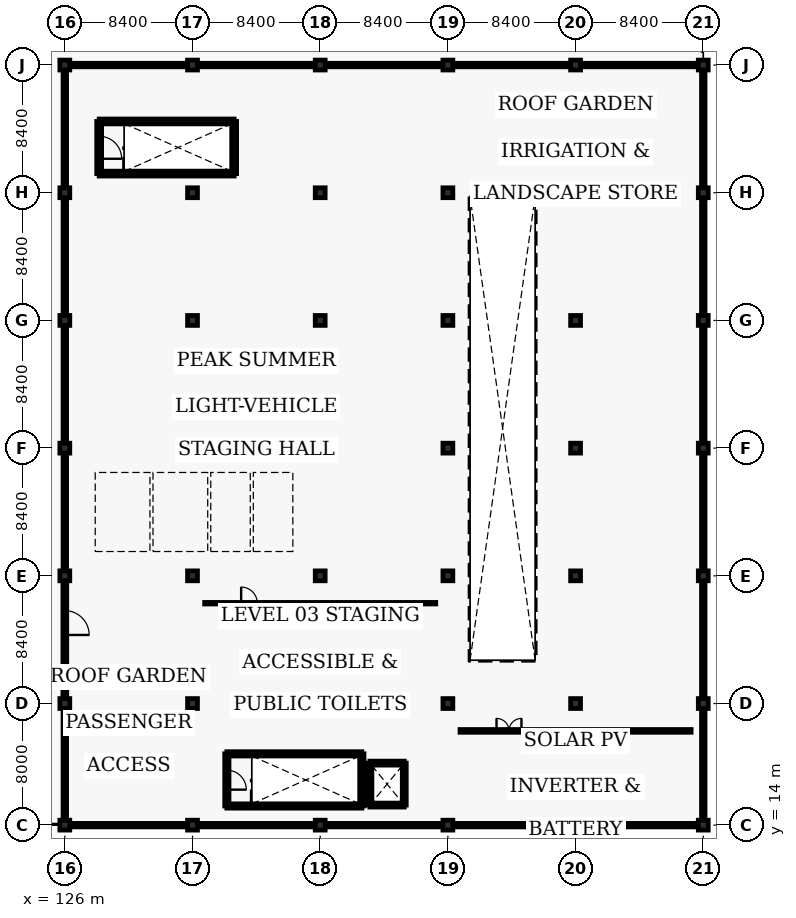
"""IFC4 building model, lengths in metres.
Left out: names, types, materials, properties, quantities, classifications, styles, units other than length and angle.
Written with IfcOpenShell. Run it as: python <this file> out.ifc"""

import sys

from ifc_helpers import new_model, si_unit, direction, frame, frame_2d, origin, origin_2d, place, context, subcontext, project, spatial, rectangle, extrude, element, fill, save


model = new_model("IFC4")
c1 = context("Model", 3, precision=1e-05, world=origin(), true_north=direction((0.0, 1.0)))
c2 = subcontext(c1, "Body", "Model", "MODEL_VIEW")
j1 = project(units=[si_unit("LENGTHUNIT", "METRE"), si_unit("PLANEANGLEUNIT", "RADIAN")], contexts=[c1])
p1 = place(None, origin())
s1 = spatial("IfcSite", under=j1, at=p1, CompositionType="ELEMENT")
p2 = place(p1, origin())
s2 = spatial("IfcBuilding", under=s1, at=p2, CompositionType="ELEMENT")
p3 = place(p2, frame((0.0, 0.0, 13.12)))
s3 = spatial("IfcBuildingStorey", under=s2, at=p3, CompositionType="ELEMENT", Elevation=13.12)
for number, where, z_axis, x_axis in (
    (1, (126.0, 14.0, 0.0), (0.0, 0.0, 1.0), (1.0, 0.0, 0.0)),
    (2, (126.0, 22.0, 0.0), (0.0, 0.0, 1.0), (1.0, 0.0, 0.0)),
    (3, (126.0, 30.4, 0.0), (0.0, 0.0, 1.0), (1.0, 0.0, 0.0)),
    (4, (126.0, 38.8, 0.0), (0.0, 0.0, 1.0), (1.0, 0.0, 0.0)),
    (5, (126.0, 47.2, 0.0), (0.0, 0.0, 1.0), (1.0, 0.0, 0.0)),
    (6, (126.0, 55.6, 0.0), (0.0, 0.0, 1.0), (1.0, 0.0, 0.0)),
    (7, (126.0, 64.0, 0.0), (0.0, 0.0, 1.0), (1.0, 0.0, 0.0)),
    (8, (134.4, 14.0, 0.0), (0.0, 0.0, 1.0), (1.0, 0.0, 0.0)),
    (9, (134.4, 22.0, 0.0), (0.0, 0.0, 1.0), (1.0, 0.0, 0.0)),
    (10, (134.4, 30.4, 0.0), (0.0, 0.0, 1.0), (1.0, 0.0, 0.0)),
    (11, (134.4, 38.8, 0.0), (0.0, 0.0, 1.0), (1.0, 0.0, 0.0)),
    (12, (134.4, 47.2, 0.0), (0.0, 0.0, 1.0), (1.0, 0.0, 0.0)),
    (13, (134.4, 55.6, 0.0), (0.0, 0.0, 1.0), (1.0, 0.0, 0.0)),
    (14, (134.4, 64.0, 0.0), (0.0, 0.0, 1.0), (1.0, 0.0, 0.0)),
    (15, (142.8, 14.0, 0.0), (0.0, 0.0, 1.0), (1.0, 0.0, 0.0)),
    (16, (142.8, 22.0, 0.0), (0.0, 0.0, 1.0), (1.0, 0.0, 0.0)),
    (17, (142.8, 30.4, 0.0), (0.0, 0.0, 1.0), (1.0, 0.0, 0.0)),
    (18, (142.8, 38.8, 0.0), (0.0, 0.0, 1.0), (1.0, 0.0, 0.0)),
    (19, (142.8, 47.2, 0.0), (0.0, 0.0, 1.0), (1.0, 0.0, 0.0)),
    (20, (142.8, 55.6, 0.0), (0.0, 0.0, 1.0), (1.0, 0.0, 0.0)),
    (21, (142.8, 64.0, 0.0), (0.0, 0.0, 1.0), (1.0, 0.0, 0.0)),
    (22, (151.2, 14.0, 0.0), (0.0, 0.0, 1.0), (1.0, 0.0, 0.0)),
    (23, (151.2, 22.0, 0.0), (0.0, 0.0, 1.0), (1.0, 0.0, 0.0)),
    (24, (151.2, 30.4, 0.0), (0.0, 0.0, 1.0), (1.0, 0.0, 0.0)),
    (25, (151.2, 38.8, 0.0), (0.0, 0.0, 1.0), (1.0, 0.0, 0.0)),
    (26, (151.2, 47.2, 0.0), (0.0, 0.0, 1.0), (1.0, 0.0, 0.0)),
    (27, (151.2, 55.6, 0.0), (0.0, 0.0, 1.0), (1.0, 0.0, 0.0)),
    (28, (151.2, 64.0, 0.0), (0.0, 0.0, 1.0), (1.0, 0.0, 0.0)),
    (29, (159.6, 14.0, 0.0), (0.0, 0.0, 1.0), (1.0, 0.0, 0.0)),
    (30, (159.6, 22.0, 0.0), (0.0, 0.0, 1.0), (1.0, 0.0, 0.0)),
    (31, (159.6, 30.4, 0.0), (0.0, 0.0, 1.0), (1.0, 0.0, 0.0)),
    (32, (159.6, 38.8, 0.0), (0.0, 0.0, 1.0), (1.0, 0.0, 0.0)),
    (33, (159.6, 47.2, 0.0), (0.0, 0.0, 1.0), (1.0, 0.0, 0.0)),
    (34, (159.6, 55.6, 0.0), (0.0, 0.0, 1.0), (1.0, 0.0, 0.0)),
    (35, (159.6, 64.0, 0.0), (0.0, 0.0, 1.0), (1.0, 0.0, 0.0)),
    (36, (168.0, 14.0, 0.0), (0.0, 0.0, 1.0), (1.0, 0.0, 0.0)),
    (37, (168.0, 22.0, 0.0), (0.0, 0.0, 1.0), (1.0, 0.0, 0.0)),
    (38, (168.0, 30.4, 0.0), (0.0, 0.0, 1.0), (1.0, 0.0, 0.0)),
    (39, (168.0, 38.8, 0.0), (0.0, 0.0, 1.0), (1.0, 0.0, 0.0)),
    (40, (168.0, 47.2, 0.0), (0.0, 0.0, 1.0), (1.0, 0.0, 0.0)),
    (41, (168.0, 55.6, 0.0), (0.0, 0.0, 1.0), (1.0, 0.0, 0.0)),
    (42, (168.0, 64.0, 0.0), (0.0, 0.0, 1.0), (1.0, 0.0, 0.0)),
):
    element("IfcColumn", number, at=place(p3, frame(where, z_axis=z_axis, x_axis=x_axis)), inside=s3, PredefinedType="COLUMN", context=c2, shape_type="SweptSolid", body=[
        extrude(rectangle(XDim=0.65, YDim=0.65, at=origin_2d()), origin(), (0.0, 0.0, 1.0), 3.2),
    ])
p4 = place(p3, frame((126.0, 30.075, 0.0), z_axis=(0.0, 0.0, 1.0), x_axis=(0.0, -1.0, 0.0)))
e43 = element("IfcWall", 43, at=p4, inside=s3, PredefinedType="SOLIDWALL", context=c2, shape_type="SweptSolid", body=[
    extrude(rectangle(XDim=7.75, YDim=0.25, at=frame_2d((3.875, 0.0))), origin(), (0.0, 0.0, 1.0), 2.325),
])
p5 = place(p4, frame((1.965, 0.0, 0.0)))
e44 = element("IfcOpeningElement", 44, at=p5, cuts=e43, PredefinedType="OPENING", context=c2, shape_type="SweptSolid", body=[
    extrude(rectangle(XDim=1.6, YDim=2.1, at=frame_2d((0.8, 1.05))), frame((0.0, 0.135, 0.0), z_axis=(0.0, -1.0, 0.0), x_axis=(1.0, 0.0, 0.0)), (0.0, 0.0, 1.0), 0.27),
])
p6 = place(p4, frame((4.315, 0.0, 0.85)))
e45 = element("IfcOpeningElement", 45, at=p6, cuts=e43, PredefinedType="OPENING", context=c2, shape_type="SweptSolid", body=[
    extrude(rectangle(XDim=1.65, YDim=1.4, at=frame_2d((0.825, 0.7))), frame((0.0, 0.135, 0.0), z_axis=(0.0, -1.0, 0.0), x_axis=(1.0, 0.0, 0.0)), (0.0, 0.0, 1.0), 0.27),
])
for number, where, z_axis, x_axis in (
    (46, (126.325, 14.0, 0.0), (0.0, 0.0, 1.0), (1.0, 0.0, 0.0)),
    (47, (126.325, 64.0, 0.0), (0.0, 0.0, 1.0), (1.0, 0.0, 0.0)),
    (48, (134.725, 14.0, 0.0), (0.0, 0.0, 1.0), (1.0, 0.0, 0.0)),
    (49, (134.725, 64.0, 0.0), (0.0, 0.0, 1.0), (1.0, 0.0, 0.0)),
    (50, (143.125, 14.0, 0.0), (0.0, 0.0, 1.0), (1.0, 0.0, 0.0)),
    (51, (143.125, 64.0, 0.0), (0.0, 0.0, 1.0), (1.0, 0.0, 0.0)),
    (52, (151.525, 14.0, 0.0), (0.0, 0.0, 1.0), (1.0, 0.0, 0.0)),
    (53, (151.525, 64.0, 0.0), (0.0, 0.0, 1.0), (1.0, 0.0, 0.0)),
    (54, (159.925, 14.0, 0.0), (0.0, 0.0, 1.0), (1.0, 0.0, 0.0)),
    (55, (159.925, 64.0, 0.0), (0.0, 0.0, 1.0), (1.0, 0.0, 0.0)),
):
    element("IfcWall", number, at=place(p3, frame(where, z_axis=z_axis, x_axis=x_axis)), inside=s3, PredefinedType="PARAPET", context=c2, shape_type="SweptSolid", body=[
        extrude(rectangle(XDim=7.75, YDim=0.23, at=frame_2d((3.875, 0.0))), origin(), (0.0, 0.0, 1.0), 1.15),
    ])
for number, where, z_axis, x_axis in (
    (56, (126.0, 14.325, 0.0), (0.0, 0.0, 1.0), (0.0, 1.0, 0.0)),
    (57, (168.0, 14.325, 0.0), (0.0, 0.0, 1.0), (0.0, 1.0, 0.0)),
):
    element("IfcWall", number, at=place(p3, frame(where, z_axis=z_axis, x_axis=x_axis)), inside=s3, PredefinedType="PARAPET", context=c2, shape_type="SweptSolid", body=[
        extrude(rectangle(XDim=7.35, YDim=0.23, at=frame_2d((3.675, 0.0))), origin(), (0.0, 0.0, 1.0), 1.15),
    ])
for number, where, z_axis, x_axis in (
    (58, (168.0, 22.325, 0.0), (0.0, 0.0, 1.0), (0.0, 1.0, 0.0)),
    (59, (126.0, 30.725, 0.0), (0.0, 0.0, 1.0), (0.0, 1.0, 0.0)),
    (60, (168.0, 30.725, 0.0), (0.0, 0.0, 1.0), (0.0, 1.0, 0.0)),
    (61, (126.0, 39.125, 0.0), (0.0, 0.0, 1.0), (0.0, 1.0, 0.0)),
    (62, (168.0, 39.125, 0.0), (0.0, 0.0, 1.0), (0.0, 1.0, 0.0)),
    (63, (126.0, 47.525, 0.0), (0.0, 0.0, 1.0), (0.0, 1.0, 0.0)),
    (64, (168.0, 47.525, 0.0), (0.0, 0.0, 1.0), (0.0, 1.0, 0.0)),
    (65, (126.0, 55.925, 0.0), (0.0, 0.0, 1.0), (0.0, 1.0, 0.0)),
    (66, (168.0, 55.925, 0.0), (0.0, 0.0, 1.0), (0.0, 1.0, 0.0)),
):
    element("IfcWall", number, at=place(p3, frame(where, z_axis=z_axis, x_axis=x_axis)), inside=s3, PredefinedType="PARAPET", context=c2, shape_type="SweptSolid", body=[
        extrude(rectangle(XDim=7.75, YDim=0.23, at=frame_2d((3.875, 0.0))), origin(), (0.0, 0.0, 1.0), 1.15),
    ])
for number, where, z_axis, x_axis in (
    (67, (136.66, 15.26, 0.0), (0.0, 0.0, 1.0), (1.0, 0.0, 0.0)),
    (68, (136.66, 18.69, 0.0), (0.0, 0.0, 1.0), (1.0, 0.0, 0.0)),
):
    element("IfcWall", number, at=place(p3, frame(where, z_axis=z_axis, x_axis=x_axis)), inside=s3, PredefinedType="SHEAR", context=c2, shape_type="SweptSolid", body=[
        extrude(rectangle(XDim=8.88, YDim=0.28, at=frame_2d((4.44, 0.0))), origin(), (0.0, 0.0, 1.0), 3.2),
    ])
p7 = place(p3, frame((136.66, 18.69, 0.0), z_axis=(0.0, 0.0, 1.0), x_axis=(0.0, -1.0, 0.0)))
e69 = element("IfcWall", 69, at=p7, inside=s3, PredefinedType="SHEAR", context=c2, shape_type="SweptSolid", body=[
    extrude(rectangle(XDim=3.43, YDim=0.28, at=frame_2d((1.715, 0.0))), origin(), (0.0, 0.0, 1.0), 3.2),
])
p8 = place(p7, frame((1.075, 0.0, 0.0)))
e70 = element("IfcOpeningElement", 70, at=p8, cuts=e69, PredefinedType="OPENING", context=c2, shape_type="SweptSolid", body=[
    extrude(rectangle(XDim=1.28, YDim=2.1, at=frame_2d((0.64, 1.05))), frame((0.0, 0.15, 0.0), z_axis=(0.0, -1.0, 0.0), x_axis=(1.0, 0.0, 0.0)), (0.0, 0.0, 1.0), 0.3),
])
p9 = place(p3, frame((145.54, 15.26, 0.0), z_axis=(0.0, 0.0, 1.0), x_axis=(0.0, 1.0, 0.0)))
e71 = element("IfcWall", 71, at=p9, inside=s3, PredefinedType="SHEAR", context=c2, shape_type="SweptSolid", body=[
    extrude(rectangle(XDim=3.43, YDim=0.28, at=frame_2d((1.715, 0.0))), origin(), (0.0, 0.0, 1.0), 3.2),
])
p10 = place(p3, frame((146.07, 15.32, 0.0), z_axis=(0.0, 0.0, 1.0), x_axis=(1.0, 0.0, 0.0)))
e72 = element("IfcWall", 72, at=p10, inside=s3, PredefinedType="SHEAR", context=c2, shape_type="SweptSolid", body=[
    extrude(rectangle(XDim=2.26, YDim=0.26, at=frame_2d((1.13, 0.0))), origin(), (0.0, 0.0, 1.0), 3.2),
])
for number, where, z_axis, x_axis in (
    (73, (148.33, 15.32, 0.0), (0.0, 0.0, 1.0), (0.0, 1.0, 0.0)),
    (74, (146.07, 18.08, 0.0), (0.0, 0.0, 1.0), (0.0, -1.0, 0.0)),
):
    element("IfcWall", number, at=place(p3, frame(where, z_axis=z_axis, x_axis=x_axis)), inside=s3, PredefinedType="SHEAR", context=c2, shape_type="SweptSolid", body=[
        extrude(rectangle(XDim=2.76, YDim=0.26, at=frame_2d((1.38, 0.0))), origin(), (0.0, 0.0, 1.0), 3.2),
    ])
p11 = place(p3, frame((146.07, 18.08, 0.0), z_axis=(0.0, 0.0, 1.0), x_axis=(1.0, 0.0, 0.0)))
e75 = element("IfcWall", 75, at=p11, inside=s3, PredefinedType="SHEAR", context=c2, shape_type="SweptSolid", body=[
    extrude(rectangle(XDim=2.26, YDim=0.26, at=frame_2d((1.13, 0.0))), origin(), (0.0, 0.0, 1.0), 3.2),
])
p12 = place(p11, frame((0.51, 0.0, 0.0)))
e76 = element("IfcOpeningElement", 76, at=p12, cuts=e75, PredefinedType="OPENING", context=c2, shape_type="SweptSolid", body=[
    extrude(rectangle(XDim=1.24, YDim=2.14, at=frame_2d((0.62, 1.07))), frame((0.0, 0.14, 0.0), z_axis=(0.0, -1.0, 0.0), x_axis=(1.0, 0.0, 0.0)), (0.0, 0.0, 1.0), 0.28),
])
for number, where, z_axis, x_axis in (
    (77, (128.26, 56.86, 0.0), (0.0, 0.0, 1.0), (1.0, 0.0, 0.0)),
    (78, (128.26, 60.29, 0.0), (0.0, 0.0, 1.0), (1.0, 0.0, 0.0)),
):
    element("IfcWall", number, at=place(p3, frame(where, z_axis=z_axis, x_axis=x_axis)), inside=s3, PredefinedType="SHEAR", context=c2, shape_type="SweptSolid", body=[
        extrude(rectangle(XDim=8.88, YDim=0.32, at=frame_2d((4.44, 0.0))), origin(), (0.0, 0.0, 1.0), 3.2),
    ])
p13 = place(p3, frame((128.26, 60.29, 0.0), z_axis=(0.0, 0.0, 1.0), x_axis=(0.0, -1.0, 0.0)))
e79 = element("IfcWall", 79, at=p13, inside=s3, PredefinedType="SHEAR", context=c2, shape_type="SweptSolid", body=[
    extrude(rectangle(XDim=3.43, YDim=0.32, at=frame_2d((1.715, 0.0))), origin(), (0.0, 0.0, 1.0), 3.2),
])
p14 = place(p13, frame((0.975, 0.0, 0.0)))
e80 = element("IfcOpeningElement", 80, at=p14, cuts=e79, PredefinedType="OPENING", context=c2, shape_type="SweptSolid", body=[
    extrude(rectangle(XDim=1.48, YDim=2.15, at=frame_2d((0.74, 1.075))), frame((0.0, 0.17, 0.0), z_axis=(0.0, -1.0, 0.0), x_axis=(1.0, 0.0, 0.0)), (0.0, 0.0, 1.0), 0.34),
])
p15 = place(p3, frame((137.14, 56.86, 0.0), z_axis=(0.0, 0.0, 1.0), x_axis=(0.0, 1.0, 0.0)))
e81 = element("IfcWall", 81, at=p15, inside=s3, PredefinedType="SHEAR", context=c2, shape_type="SweptSolid", body=[
    extrude(rectangle(XDim=3.43, YDim=0.32, at=frame_2d((1.715, 0.0))), origin(), (0.0, 0.0, 1.0), 3.2),
])
p16 = place(p3, frame((152.0, 20.2, 0.0), z_axis=(0.0, 0.0, 1.0), x_axis=(1.0, 0.0, 0.0)))
e82 = element("IfcWall", 82, at=p16, inside=s3, PredefinedType="SOLIDWALL", context=c2, shape_type="SweptSolid", body=[
    extrude(rectangle(XDim=15.2, YDim=0.18, at=frame_2d((7.6, 0.0))), origin(), (0.0, 0.0, 1.0), 2.375),
])
p17 = place(p16, frame((2.4, 0.0, 0.0)))
e83 = element("IfcOpeningElement", 83, at=p17, cuts=e82, PredefinedType="OPENING", context=c2, shape_type="SweptSolid", body=[
    extrude(rectangle(XDim=1.64, YDim=2.16, at=frame_2d((0.82, 1.08))), frame((0.0, 0.1, 0.0), z_axis=(0.0, -1.0, 0.0), x_axis=(1.0, 0.0, 0.0)), (0.0, 0.0, 1.0), 0.2),
])
p18 = place(p3, frame((135.2, 28.6, 0.0), z_axis=(0.0, 0.0, 1.0), x_axis=(1.0, 0.0, 0.0)))
e84 = element("IfcWall", 84, at=p18, inside=s3, PredefinedType="PARTITIONING", context=c2, shape_type="SweptSolid", body=[
    extrude(rectangle(XDim=15.2, YDim=0.1, at=frame_2d((7.6, 0.0))), origin(), (0.0, 0.0, 1.0), 2.375),
])
p19 = place(p18, frame((2.4, 0.0, 0.0)))
e85 = element("IfcOpeningElement", 85, at=p19, cuts=e84, PredefinedType="OPENING", context=c2, shape_type="SweptSolid", body=[
    extrude(rectangle(XDim=1.06, YDim=2.1, at=frame_2d((0.53, 1.05))), frame((0.0, 0.06, 0.0), z_axis=(0.0, -1.0, 0.0), x_axis=(1.0, 0.0, 0.0)), (0.0, 0.0, 1.0), 0.12),
])
p20 = place(p5, origin())
e86 = element("IfcDoor", 86, at=p20, inside=s3, OperationType="SINGLE_SWING_RIGHT", PredefinedType="DOOR", context=c2, shape_type="SweptSolid", body=[
    extrude(rectangle(XDim=1.6, YDim=2.1, at=frame_2d((0.8, 1.05))), frame((0.0, 0.025, 0.0), z_axis=(0.0, -1.0, 0.0), x_axis=(1.0, 0.0, 0.0)), (0.0, 0.0, 1.0), 0.05),
])
fill(e44, e86)
p21 = place(p6, origin())
e87 = element("IfcWindow", 87, at=p21, inside=s3, PartitioningType="DOUBLE_PANEL_VERTICAL", PredefinedType="WINDOW", context=c2, shape_type="SweptSolid", body=[
    extrude(rectangle(XDim=1.65, YDim=1.4, at=frame_2d((0.825, 0.7))), frame((0.0, 0.03, 0.0), z_axis=(0.0, -1.0, 0.0), x_axis=(1.0, 0.0, 0.0)), (0.0, 0.0, 1.0), 0.06),
])
fill(e45, e87)
p22 = place(p8, origin())
e88 = element("IfcDoor", 88, at=p22, inside=s3, OperationType="SINGLE_SWING_RIGHT", PredefinedType="DOOR", context=c2, shape_type="SweptSolid", body=[
    extrude(rectangle(XDim=1.28, YDim=2.1, at=frame_2d((0.64, 1.05))), frame((0.0, 0.025, 0.0), z_axis=(0.0, -1.0, 0.0), x_axis=(1.0, 0.0, 0.0)), (0.0, 0.0, 1.0), 0.05),
])
fill(e70, e88)
p23 = place(p12, origin())
e89 = element("IfcDoor", 89, at=p23, inside=s3, OperationType="DOUBLE_DOOR_SLIDING", PredefinedType="DOOR", context=c2, shape_type="SweptSolid", body=[
    extrude(rectangle(XDim=1.24, YDim=2.14, at=frame_2d((0.62, 1.07))), frame((0.0, 0.025, 0.0), z_axis=(0.0, -1.0, 0.0), x_axis=(1.0, 0.0, 0.0)), (0.0, 0.0, 1.0), 0.05),
])
fill(e76, e89)
p24 = place(p14, origin())
e90 = element("IfcDoor", 90, at=p24, inside=s3, OperationType="SINGLE_SWING_RIGHT", PredefinedType="DOOR", context=c2, shape_type="SweptSolid", body=[
    extrude(rectangle(XDim=1.48, YDim=2.15, at=frame_2d((0.74, 1.075))), frame((0.0, 0.025, 0.0), z_axis=(0.0, -1.0, 0.0), x_axis=(1.0, 0.0, 0.0)), (0.0, 0.0, 1.0), 0.05),
])
fill(e80, e90)
p25 = place(p17, origin())
e91 = element("IfcDoor", 91, at=p25, inside=s3, OperationType="DOUBLE_DOOR_SINGLE_SWING", PredefinedType="DOOR", context=c2, shape_type="SweptSolid", body=[
    extrude(rectangle(XDim=1.64, YDim=2.16, at=frame_2d((0.82, 1.08))), frame((0.0, 0.025, 0.0), z_axis=(0.0, -1.0, 0.0), x_axis=(1.0, 0.0, 0.0)), (0.0, 0.0, 1.0), 0.05),
])
fill(e83, e91)
p26 = place(p19, origin())
e92 = element("IfcDoor", 92, at=p26, inside=s3, OperationType="SINGLE_SWING_LEFT", PredefinedType="DOOR", context=c2, shape_type="SweptSolid", body=[
    extrude(rectangle(XDim=1.06, YDim=2.1, at=frame_2d((0.53, 1.05))), frame((0.0, 0.025, 0.0), z_axis=(0.0, -1.0, 0.0), x_axis=(1.0, 0.0, 0.0)), (0.0, 0.0, 1.0), 0.05),
])
fill(e85, e92)
save(model, sys.argv[1])
